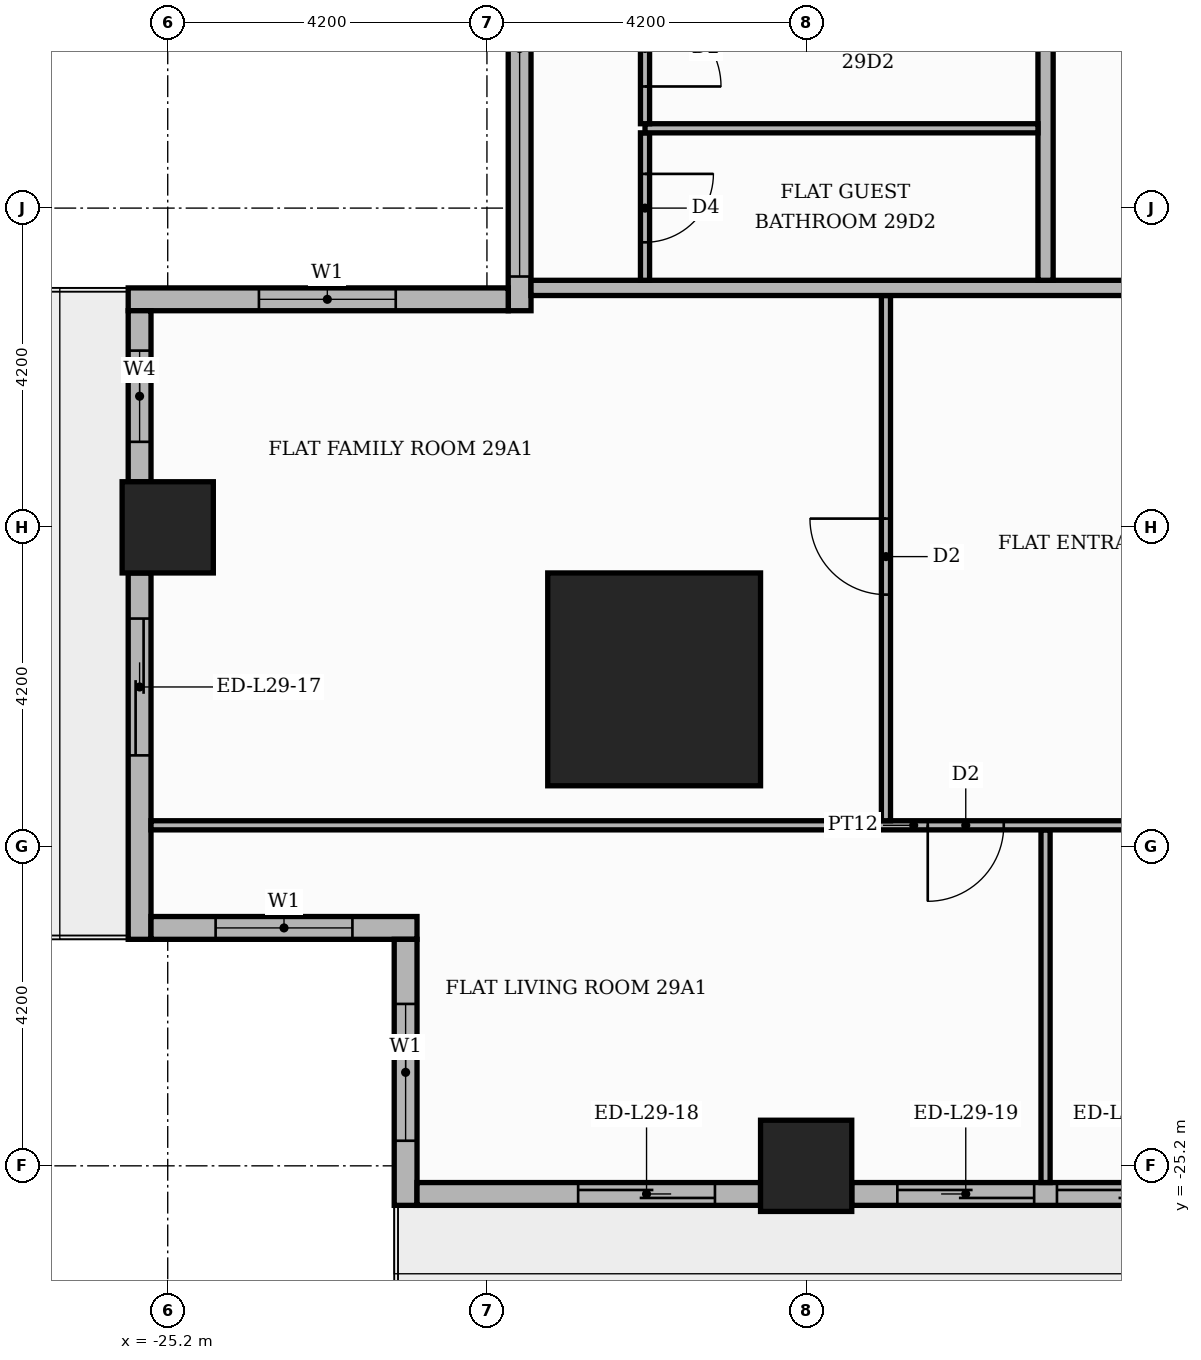
"""IFC4 building model, lengths in metres.
Left out: names, types, materials, properties, quantities, classifications, styles, units other than length and angle.
Written with IfcOpenShell. Run it as: python <this file> out.ifc"""

import sys

from ifc_helpers import new_model, si_unit, direction, frame, frame_2d, origin, origin_2d, place, context, subcontext, project, spatial, rectangle, extrude, element, fill, save


model = new_model("IFC4")
c1 = context("Model", 3, precision=1e-05, world=origin(), true_north=direction((0.0, 1.0)))
c2 = subcontext(c1, "Body", "Model", "MODEL_VIEW")
j1 = project(units=[si_unit("LENGTHUNIT", "METRE"), si_unit("PLANEANGLEUNIT", "RADIAN")], contexts=[c1])
p1 = place(None, origin())
s1 = spatial("IfcSite", under=j1, at=p1, CompositionType="ELEMENT")
p2 = place(p1, origin())
s2 = spatial("IfcBuilding", under=s1, at=p2, CompositionType="ELEMENT")
p3 = place(p2, frame((0.0, 0.0, 122.1)))
s3 = spatial("IfcBuildingStorey", under=s2, at=p3, CompositionType="ELEMENT", Elevation=122.1)
p4 = place(p3, frame((-18.8, -18.8, 0.0), z_axis=(0.0, 0.0, 1.0), x_axis=(1.0, 0.0, 0.0)))
e1 = element("IfcColumn", 1, at=p4, inside=s3, PredefinedType="COLUMN", context=c2, shape_type="SweptSolid", body=[
    extrude(rectangle(XDim=2.8, YDim=2.8, at=origin_2d()), origin(), (0.0, 0.0, 1.0), 3.9),
])
for number, where, z_axis, x_axis in (
    (2, (-16.8, -25.2, 0.0), (0.0, 0.0, 1.0), (1.0, 0.0, 0.0)),
    (3, (-25.2, -16.8, 0.0), (0.0, 0.0, 1.0), (1.0, 0.0, 0.0)),
):
    element("IfcColumn", number, at=place(p3, frame(where, z_axis=z_axis, x_axis=x_axis)), inside=s3, PredefinedType="COLUMN", context=c2, shape_type="SweptSolid", body=[
        extrude(rectangle(XDim=1.2, YDim=1.2, at=origin_2d()), origin(), (0.0, 0.0, 1.0), 3.9),
    ])
p5 = place(p3, frame((-20.57, 13.65, 0.0), z_axis=(0.0, 0.0, 1.0), x_axis=(0.0, -1.0, 0.0)))
e4 = element("IfcWall", 4, at=p5, inside=s3, PredefinedType="STANDARD", context=c2, shape_type="SweptSolid", body=[
    extrude(rectangle(XDim=27.6, YDim=0.3, at=frame_2d((13.8, 0.0))), origin(), (0.0, 0.0, 1.0), 3.4),
])
p6 = place(p5, frame((0.15, 0.0, 0.9)))
e5 = element("IfcOpeningElement", 5, at=p6, cuts=e4, PredefinedType="OPENING", context=c2, shape_type="SweptSolid", body=[
    extrude(rectangle(XDim=6.0, YDim=2.1, at=frame_2d((3.0, 1.05))), frame((0.0, 0.16, 0.0), z_axis=(0.0, -1.0, 0.0), x_axis=(1.0, 0.0, 0.0)), (0.0, 0.0, 1.0), 0.32),
])
p7 = place(p5, frame((6.45, 0.0, 0.9)))
e6 = element("IfcOpeningElement", 6, at=p7, cuts=e4, PredefinedType="OPENING", context=c2, shape_type="SweptSolid", body=[
    extrude(rectangle(XDim=1.8, YDim=2.1, at=frame_2d((0.9, 1.05))), frame((0.0, 0.16, 0.0), z_axis=(0.0, -1.0, 0.0), x_axis=(1.0, 0.0, 0.0)), (0.0, 0.0, 1.0), 0.32),
])
p8 = place(p5, frame((8.55, 0.0, 0.9)))
e7 = element("IfcOpeningElement", 7, at=p8, cuts=e4, PredefinedType="OPENING", context=c2, shape_type="SweptSolid", body=[
    extrude(rectangle(XDim=6.0, YDim=2.1, at=frame_2d((3.0, 1.05))), frame((0.0, 0.16, 0.0), z_axis=(0.0, -1.0, 0.0), x_axis=(1.0, 0.0, 0.0)), (0.0, 0.0, 1.0), 0.32),
])
p9 = place(p5, frame((14.85, 0.0, 0.9)))
e8 = element("IfcOpeningElement", 8, at=p9, cuts=e4, PredefinedType="OPENING", context=c2, shape_type="SweptSolid", body=[
    extrude(rectangle(XDim=6.0, YDim=2.1, at=frame_2d((3.0, 1.05))), frame((0.0, 0.16, 0.0), z_axis=(0.0, -1.0, 0.0), x_axis=(1.0, 0.0, 0.0)), (0.0, 0.0, 1.0), 0.32),
])
p10 = place(p5, frame((21.15, 0.0, 0.9)))
e9 = element("IfcOpeningElement", 9, at=p10, cuts=e4, PredefinedType="OPENING", context=c2, shape_type="SweptSolid", body=[
    extrude(rectangle(XDim=6.0, YDim=2.1, at=frame_2d((3.0, 1.05))), frame((0.0, 0.16, 0.0), z_axis=(0.0, -1.0, 0.0), x_axis=(1.0, 0.0, 0.0)), (0.0, 0.0, 1.0), 0.32),
])
p11 = place(p3, frame((-20.72, -13.8, 0.0), z_axis=(0.0, 0.0, 1.0), x_axis=(-1.0, 0.0, 0.0)))
e10 = element("IfcWall", 10, at=p11, inside=s3, PredefinedType="STANDARD", context=c2, shape_type="SweptSolid", body=[
    extrude(rectangle(XDim=5.0, YDim=0.3, at=frame_2d((2.5, 0.0))), origin(), (0.0, 0.0, 1.0), 3.4),
])
p12 = place(p11, frame((1.48, 0.0, 0.9)))
e11 = element("IfcOpeningElement", 11, at=p12, cuts=e10, PredefinedType="OPENING", context=c2, shape_type="SweptSolid", body=[
    extrude(rectangle(XDim=1.8, YDim=2.1, at=frame_2d((0.9, 1.05))), frame((0.0, 0.16, 0.0), z_axis=(0.0, -1.0, 0.0), x_axis=(1.0, 0.0, 0.0)), (0.0, 0.0, 1.0), 0.32),
])
p13 = place(p3, frame((-25.57, -13.95, 0.0), z_axis=(0.0, 0.0, 1.0), x_axis=(0.0, -1.0, 0.0)))
e12 = element("IfcWall", 12, at=p13, inside=s3, PredefinedType="STANDARD", context=c2, shape_type="SweptSolid", body=[
    extrude(rectangle(XDim=2.25, YDim=0.3, at=frame_2d((1.125, 0.0))), origin(), (0.0, 0.0, 1.0), 3.4),
])
p14 = place(p13, frame((0.525, 0.0, 0.9)))
e13 = element("IfcOpeningElement", 13, at=p14, cuts=e12, PredefinedType="OPENING", context=c2, shape_type="SweptSolid", body=[
    extrude(rectangle(XDim=1.2, YDim=2.1, at=frame_2d((0.6, 1.05))), frame((0.0, 0.16, 0.0), z_axis=(0.0, -1.0, 0.0), x_axis=(1.0, 0.0, 0.0)), (0.0, 0.0, 1.0), 0.32),
])
p15 = place(p3, frame((-25.57, -17.4, 0.0), z_axis=(0.0, 0.0, 1.0), x_axis=(0.0, -1.0, 0.0)))
e14 = element("IfcWall", 14, at=p15, inside=s3, PredefinedType="STANDARD", context=c2, shape_type="SweptSolid", body=[
    extrude(rectangle(XDim=4.82, YDim=0.3, at=frame_2d((2.41, 0.0))), origin(), (0.0, 0.0, 1.0), 3.4),
])
p16 = place(p15, frame((0.6, 0.0, 0.0)))
e15 = element("IfcOpeningElement", 15, at=p16, cuts=e14, PredefinedType="OPENING", context=c2, shape_type="SweptSolid", body=[
    extrude(rectangle(XDim=1.8, YDim=2.4, at=frame_2d((0.9, 1.2))), frame((0.0, 0.16, 0.0), z_axis=(0.0, -1.0, 0.0), x_axis=(1.0, 0.0, 0.0)), (0.0, 0.0, 1.0), 0.32),
])
p17 = place(p3, frame((-25.42, -22.07, 0.0), z_axis=(0.0, 0.0, 1.0), x_axis=(1.0, 0.0, 0.0)))
e16 = element("IfcWall", 16, at=p17, inside=s3, PredefinedType="STANDARD", context=c2, shape_type="SweptSolid", body=[
    extrude(rectangle(XDim=3.5, YDim=0.3, at=frame_2d((1.75, 0.0))), origin(), (0.0, 0.0, 1.0), 3.4),
])
p18 = place(p17, frame((0.85, 0.0, 0.9)))
e17 = element("IfcOpeningElement", 17, at=p18, cuts=e16, PredefinedType="OPENING", context=c2, shape_type="SweptSolid", body=[
    extrude(rectangle(XDim=1.8, YDim=2.1, at=frame_2d((0.9, 1.05))), frame((0.0, 0.16, 0.0), z_axis=(0.0, -1.0, 0.0), x_axis=(1.0, 0.0, 0.0)), (0.0, 0.0, 1.0), 0.32),
])
p19 = place(p3, frame((-22.07, -22.22, 0.0), z_axis=(0.0, 0.0, 1.0), x_axis=(0.0, -1.0, 0.0)))
e18 = element("IfcWall", 18, at=p19, inside=s3, PredefinedType="STANDARD", context=c2, shape_type="SweptSolid", body=[
    extrude(rectangle(XDim=3.5, YDim=0.3, at=frame_2d((1.75, 0.0))), origin(), (0.0, 0.0, 1.0), 3.4),
])
p20 = place(p19, frame((0.85, 0.0, 0.9)))
e19 = element("IfcOpeningElement", 19, at=p20, cuts=e18, PredefinedType="OPENING", context=c2, shape_type="SweptSolid", body=[
    extrude(rectangle(XDim=1.8, YDim=2.1, at=frame_2d((0.9, 1.05))), frame((0.0, 0.16, 0.0), z_axis=(0.0, -1.0, 0.0), x_axis=(1.0, 0.0, 0.0)), (0.0, 0.0, 1.0), 0.32),
])
p21 = place(p3, frame((-21.92, -25.57, 0.0), z_axis=(0.0, 0.0, 1.0), x_axis=(1.0, 0.0, 0.0)))
e20 = element("IfcWall", 20, at=p21, inside=s3, PredefinedType="STANDARD", context=c2, shape_type="SweptSolid", body=[
    extrude(rectangle(XDim=4.52, YDim=0.3, at=frame_2d((2.26, 0.0))), origin(), (0.0, 0.0, 1.0), 3.4),
])
p22 = place(p21, frame((2.12, 0.0, 0.0)))
e21 = element("IfcOpeningElement", 21, at=p22, cuts=e20, PredefinedType="OPENING", context=c2, shape_type="SweptSolid", body=[
    extrude(rectangle(XDim=1.8, YDim=2.4, at=frame_2d((0.9, 1.2))), frame((0.0, 0.16, 0.0), z_axis=(0.0, -1.0, 0.0), x_axis=(1.0, 0.0, 0.0)), (0.0, 0.0, 1.0), 0.32),
])
p23 = place(p3, frame((-16.2, -25.57, 0.0), z_axis=(0.0, 0.0, 1.0), x_axis=(1.0, 0.0, 0.0)))
e22 = element("IfcWall", 22, at=p23, inside=s3, PredefinedType="STANDARD", context=c2, shape_type="SweptSolid", body=[
    extrude(rectangle(XDim=7.2, YDim=0.3, at=frame_2d((3.6, 0.0))), origin(), (0.0, 0.0, 1.0), 3.4),
])
p24 = place(p23, frame((0.6, 0.0, 0.0)))
e23 = element("IfcOpeningElement", 23, at=p24, cuts=e22, PredefinedType="OPENING", context=c2, shape_type="SweptSolid", body=[
    extrude(rectangle(XDim=1.8, YDim=2.4, at=frame_2d((0.9, 1.2))), frame((0.0, 0.16, 0.0), z_axis=(0.0, -1.0, 0.0), x_axis=(1.0, 0.0, 0.0)), (0.0, 0.0, 1.0), 0.32),
])
p25 = place(p23, frame((2.7, 0.0, 0.0)))
e24 = element("IfcOpeningElement", 24, at=p25, cuts=e22, PredefinedType="OPENING", context=c2, shape_type="SweptSolid", body=[
    extrude(rectangle(XDim=1.8, YDim=2.4, at=frame_2d((0.9, 1.2))), frame((0.0, 0.16, 0.0), z_axis=(0.0, -1.0, 0.0), x_axis=(1.0, 0.0, 0.0)), (0.0, 0.0, 1.0), 0.32),
])
p26 = place(p23, frame((4.8, 0.0, 0.9)))
e25 = element("IfcOpeningElement", 25, at=p26, cuts=e22, PredefinedType="OPENING", context=c2, shape_type="SweptSolid", body=[
    extrude(rectangle(XDim=1.8, YDim=2.1, at=frame_2d((0.9, 1.05))), frame((0.0, 0.16, 0.0), z_axis=(0.0, -1.0, 0.0), x_axis=(1.0, 0.0, 0.0)), (0.0, 0.0, 1.0), 0.32),
])
p27 = place(p3, frame((-13.65, -25.42, 0.0), z_axis=(0.0, 0.0, 1.0), x_axis=(0.0, 1.0, 0.0)))
e26 = element("IfcWall", 26, at=p27, inside=s3, PredefinedType="PARTITIONING", context=c2, shape_type="SweptSolid", body=[
    extrude(rectangle(XDim=4.64, YDim=0.12, at=frame_2d((2.32, 0.0))), origin(), (0.0, 0.0, 1.0), 3.4),
])
p28 = place(p3, frame((-25.42, -20.72, 0.0), z_axis=(0.0, 0.0, 1.0), x_axis=(1.0, 0.0, 0.0)))
e27 = element("IfcWall", 27, at=p28, inside=s3, PredefinedType="PARTITIONING", context=c2, shape_type="SweptSolid", body=[
    extrude(rectangle(XDim=20.07, YDim=0.12, at=frame_2d((10.035, 0.0))), origin(), (0.0, 0.0, 1.0), 3.4),
])
p29 = place(p28, frame((10.22, 0.0, 0.0)))
e28 = element("IfcOpeningElement", 28, at=p29, cuts=e27, PredefinedType="OPENING", context=c2, shape_type="SweptSolid", body=[
    extrude(rectangle(XDim=1.0, YDim=2.1, at=frame_2d((0.5, 1.05))), frame((0.0, 0.07, 0.0), z_axis=(0.0, -1.0, 0.0), x_axis=(1.0, 0.0, 0.0)), (0.0, 0.0, 1.0), 0.14),
])
p30 = place(p28, frame((13.42, 0.0, 0.0)))
e29 = element("IfcOpeningElement", 29, at=p30, cuts=e27, PredefinedType="OPENING", context=c2, shape_type="SweptSolid", body=[
    extrude(rectangle(XDim=0.9, YDim=2.1, at=frame_2d((0.45, 1.05))), frame((0.0, 0.07, 0.0), z_axis=(0.0, -1.0, 0.0), x_axis=(1.0, 0.0, 0.0)), (0.0, 0.0, 1.0), 0.14),
])
p31 = place(p3, frame((-15.75, -20.66, 0.0), z_axis=(0.0, 0.0, 1.0), x_axis=(0.0, 1.0, 0.0)))
e30 = element("IfcWall", 30, at=p31, inside=s3, PredefinedType="PARTITIONING", context=c2, shape_type="SweptSolid", body=[
    extrude(rectangle(XDim=6.91, YDim=0.12, at=frame_2d((3.455, 0.0))), origin(), (0.0, 0.0, 1.0), 3.4),
])
p32 = place(p31, frame((2.975, 0.0, 0.0)))
e31 = element("IfcOpeningElement", 31, at=p32, cuts=e30, PredefinedType="OPENING", context=c2, shape_type="SweptSolid", body=[
    extrude(rectangle(XDim=1.0, YDim=2.1, at=frame_2d((0.5, 1.05))), frame((0.0, 0.07, 0.0), z_axis=(0.0, -1.0, 0.0), x_axis=(1.0, 0.0, 0.0)), (0.0, 0.0, 1.0), 0.14),
])
p33 = place(p3, frame((-20.42, -13.65, 0.0), z_axis=(0.0, 0.0, 1.0), x_axis=(1.0, 0.0, 0.0)))
e32 = element("IfcWall", 32, at=p33, inside=s3, PredefinedType="PARTITIONING", context=c2, shape_type="SweptSolid", body=[
    extrude(rectangle(XDim=34.07, YDim=0.2, at=frame_2d((17.035, 0.0))), origin(), (0.0, 0.0, 1.0), 3.4),
])
p34 = place(p33, frame((8.32, 0.0, 0.0)))
e33 = element("IfcOpeningElement", 33, at=p34, cuts=e32, PredefinedType="OPENING", context=c2, shape_type="SweptSolid", body=[
    extrude(rectangle(XDim=1.1, YDim=2.4, at=frame_2d((0.55, 1.2))), frame((0.0, 0.11, 0.0), z_axis=(0.0, -1.0, 0.0), x_axis=(1.0, 0.0, 0.0)), (0.0, 0.0, 1.0), 0.22),
])
p35 = place(p33, frame((16.72, 0.0, 0.0)))
e34 = element("IfcOpeningElement", 34, at=p35, cuts=e32, PredefinedType="OPENING", context=c2, shape_type="SweptSolid", body=[
    extrude(rectangle(XDim=1.1, YDim=2.4, at=frame_2d((0.55, 1.2))), frame((0.0, 0.11, 0.0), z_axis=(0.0, -1.0, 0.0), x_axis=(1.0, 0.0, 0.0)), (0.0, 0.0, 1.0), 0.22),
])
p36 = place(p3, frame((-18.92, -13.55, 0.0), z_axis=(0.0, 0.0, 1.0), x_axis=(0.0, 1.0, 0.0)))
e35 = element("IfcWall", 35, at=p36, inside=s3, PredefinedType="PARTITIONING", context=c2, shape_type="SweptSolid", body=[
    extrude(rectangle(XDim=1.94, YDim=0.12, at=frame_2d((0.97, 0.0))), origin(), (0.0, 0.0, 1.0), 3.4),
])
p37 = place(p36, frame((0.5, 0.0, 0.0)))
e36 = element("IfcOpeningElement", 36, at=p37, cuts=e35, PredefinedType="OPENING", context=c2, shape_type="SweptSolid", body=[
    extrude(rectangle(XDim=0.9, YDim=2.1, at=frame_2d((0.45, 1.05))), frame((0.0, 0.07, 0.0), z_axis=(0.0, -1.0, 0.0), x_axis=(1.0, 0.0, 0.0)), (0.0, 0.0, 1.0), 0.14),
])
p38 = place(p3, frame((-13.65, -13.55, 0.0), z_axis=(0.0, 0.0, 1.0), x_axis=(0.0, 1.0, 0.0)))
e37 = element("IfcWall", 37, at=p38, inside=s3, PredefinedType="PARTITIONING", context=c2, shape_type="SweptSolid", body=[
    extrude(rectangle(XDim=18.7, YDim=0.2, at=frame_2d((9.35, 0.0))), origin(), (0.0, 0.0, 1.0), 3.4),
])
p39 = place(p38, frame((11.95, 0.0, 0.0)))
e38 = element("IfcOpeningElement", 38, at=p39, cuts=e37, PredefinedType="OPENING", context=c2, shape_type="SweptSolid", body=[
    extrude(rectangle(XDim=1.1, YDim=2.4, at=frame_2d((0.55, 1.2))), frame((0.0, 0.11, 0.0), z_axis=(0.0, -1.0, 0.0), x_axis=(1.0, 0.0, 0.0)), (0.0, 0.0, 1.0), 0.22),
])
p40 = place(p3, frame((-18.92, -11.55, 0.0), z_axis=(0.0, 0.0, 1.0), x_axis=(1.0, 0.0, 0.0)))
e39 = element("IfcWall", 39, at=p40, inside=s3, PredefinedType="PARTITIONING", context=c2, shape_type="SweptSolid", body=[
    extrude(rectangle(XDim=5.17, YDim=0.12, at=frame_2d((2.585, 0.0))), origin(), (0.0, 0.0, 1.0), 3.4),
])
p41 = place(p3, frame((-18.92, -11.49, 0.0), z_axis=(0.0, 0.0, 1.0), x_axis=(0.0, 1.0, 0.0)))
e40 = element("IfcWall", 40, at=p41, inside=s3, PredefinedType="PARTITIONING", context=c2, shape_type="SweptSolid", body=[
    extrude(rectangle(XDim=1.98, YDim=0.12, at=frame_2d((0.99, 0.0))), origin(), (0.0, 0.0, 1.0), 3.4),
])
p42 = place(p41, frame((0.49, 0.0, 0.0)))
e41 = element("IfcOpeningElement", 41, at=p42, cuts=e40, PredefinedType="OPENING", context=c2, shape_type="SweptSolid", body=[
    extrude(rectangle(XDim=1.0, YDim=2.1, at=frame_2d((0.5, 1.05))), frame((0.0, 0.07, 0.0), z_axis=(0.0, -1.0, 0.0), x_axis=(1.0, 0.0, 0.0)), (0.0, 0.0, 1.0), 0.14),
])
p43 = place(p10, origin())
e42 = element("IfcWindow", 42, at=p43, inside=s3, PartitioningType="SINGLE_PANEL", PredefinedType="WINDOW", context=c2, shape_type="SweptSolid", body=[
    extrude(rectangle(XDim=6.0, YDim=2.1, at=frame_2d((3.0, 1.05))), frame((0.0, 0.03, 0.0), z_axis=(0.0, -1.0, 0.0), x_axis=(1.0, 0.0, 0.0)), (0.0, 0.0, 1.0), 0.06),
])
fill(e9, e42)
p44 = place(p12, origin())
e43 = element("IfcWindow", 43, at=p44, inside=s3, PartitioningType="SINGLE_PANEL", PredefinedType="WINDOW", context=c2, shape_type="SweptSolid", body=[
    extrude(rectangle(XDim=1.8, YDim=2.1, at=frame_2d((0.9, 1.05))), frame((0.0, 0.03, 0.0), z_axis=(0.0, -1.0, 0.0), x_axis=(1.0, 0.0, 0.0)), (0.0, 0.0, 1.0), 0.06),
])
fill(e11, e43)
p45 = place(p14, origin())
e44 = element("IfcWindow", 44, at=p45, inside=s3, PartitioningType="SINGLE_PANEL", PredefinedType="WINDOW", context=c2, shape_type="SweptSolid", body=[
    extrude(rectangle(XDim=1.2, YDim=2.1, at=frame_2d((0.6, 1.05))), frame((0.0, 0.03, 0.0), z_axis=(0.0, -1.0, 0.0), x_axis=(1.0, 0.0, 0.0)), (0.0, 0.0, 1.0), 0.06),
])
fill(e13, e44)
p46 = place(p16, origin())
e45 = element("IfcDoor", 45, at=p46, inside=s3, OperationType="SLIDING_TO_LEFT", PredefinedType="DOOR", context=c2, shape_type="SweptSolid", body=[
    extrude(rectangle(XDim=1.8, YDim=2.4, at=frame_2d((0.9, 1.2))), frame((0.0, 0.025, 0.0), z_axis=(0.0, -1.0, 0.0), x_axis=(1.0, 0.0, 0.0)), (0.0, 0.0, 1.0), 0.05),
])
fill(e15, e45)
p47 = place(p18, origin())
e46 = element("IfcWindow", 46, at=p47, inside=s3, PartitioningType="SINGLE_PANEL", PredefinedType="WINDOW", context=c2, shape_type="SweptSolid", body=[
    extrude(rectangle(XDim=1.8, YDim=2.1, at=frame_2d((0.9, 1.05))), frame((0.0, 0.03, 0.0), z_axis=(0.0, -1.0, 0.0), x_axis=(1.0, 0.0, 0.0)), (0.0, 0.0, 1.0), 0.06),
])
fill(e17, e46)
p48 = place(p20, origin())
e47 = element("IfcWindow", 47, at=p48, inside=s3, PartitioningType="SINGLE_PANEL", PredefinedType="WINDOW", context=c2, shape_type="SweptSolid", body=[
    extrude(rectangle(XDim=1.8, YDim=2.1, at=frame_2d((0.9, 1.05))), frame((0.0, 0.03, 0.0), z_axis=(0.0, -1.0, 0.0), x_axis=(1.0, 0.0, 0.0)), (0.0, 0.0, 1.0), 0.06),
])
fill(e19, e47)
p49 = place(p22, origin())
e48 = element("IfcDoor", 48, at=p49, inside=s3, OperationType="SLIDING_TO_RIGHT", PredefinedType="DOOR", context=c2, shape_type="SweptSolid", body=[
    extrude(rectangle(XDim=1.8, YDim=2.4, at=frame_2d((0.9, 1.2))), frame((0.0, 0.025, 0.0), z_axis=(0.0, -1.0, 0.0), x_axis=(1.0, 0.0, 0.0)), (0.0, 0.0, 1.0), 0.05),
])
fill(e21, e48)
p50 = place(p24, origin())
e49 = element("IfcDoor", 49, at=p50, inside=s3, OperationType="SLIDING_TO_LEFT", PredefinedType="DOOR", context=c2, shape_type="SweptSolid", body=[
    extrude(rectangle(XDim=1.8, YDim=2.4, at=frame_2d((0.9, 1.2))), frame((0.0, 0.025, 0.0), z_axis=(0.0, -1.0, 0.0), x_axis=(1.0, 0.0, 0.0)), (0.0, 0.0, 1.0), 0.05),
])
fill(e23, e49)
p51 = place(p25, origin())
e50 = element("IfcDoor", 50, at=p51, inside=s3, OperationType="SLIDING_TO_RIGHT", PredefinedType="DOOR", context=c2, shape_type="SweptSolid", body=[
    extrude(rectangle(XDim=1.8, YDim=2.4, at=frame_2d((0.9, 1.2))), frame((0.0, 0.025, 0.0), z_axis=(0.0, -1.0, 0.0), x_axis=(1.0, 0.0, 0.0)), (0.0, 0.0, 1.0), 0.05),
])
fill(e24, e50)
p52 = place(p32, origin())
e51 = element("IfcDoor", 51, at=p52, inside=s3, OperationType="SINGLE_SWING_RIGHT", PredefinedType="DOOR", context=c2, shape_type="SweptSolid", body=[
    extrude(rectangle(XDim=1.0, YDim=2.1, at=frame_2d((0.5, 1.05))), frame((0.0, 0.025, 0.0), z_axis=(0.0, -1.0, 0.0), x_axis=(1.0, 0.0, 0.0)), (0.0, 0.0, 1.0), 0.05),
])
fill(e31, e51)
p53 = place(p29, frame((1.0, 0.0, 0.0), z_axis=(0.0, 0.0, 1.0), x_axis=(-1.0, 0.0, 0.0)))
e52 = element("IfcDoor", 52, at=p53, inside=s3, OperationType="SINGLE_SWING_LEFT", PredefinedType="DOOR", context=c2, shape_type="SweptSolid", body=[
    extrude(rectangle(XDim=1.0, YDim=2.1, at=frame_2d((0.5, 1.05))), frame((0.0, 0.025, 0.0), z_axis=(0.0, -1.0, 0.0), x_axis=(1.0, 0.0, 0.0)), (0.0, 0.0, 1.0), 0.05),
])
fill(e28, e52)
p54 = place(p42, frame((1.0, 0.0, 0.0), z_axis=(0.0, 0.0, 1.0), x_axis=(-1.0, 0.0, 0.0)))
e53 = element("IfcDoor", 53, at=p54, inside=s3, OperationType="SINGLE_SWING_LEFT", PredefinedType="DOOR", context=c2, shape_type="SweptSolid", body=[
    extrude(rectangle(XDim=1.0, YDim=2.1, at=frame_2d((0.5, 1.05))), frame((0.0, 0.025, 0.0), z_axis=(0.0, -1.0, 0.0), x_axis=(1.0, 0.0, 0.0)), (0.0, 0.0, 1.0), 0.05),
])
fill(e41, e53)
p55 = place(p37, frame((0.9, 0.0, 0.0), z_axis=(0.0, 0.0, 1.0), x_axis=(-1.0, 0.0, 0.0)))
e54 = element("IfcDoor", 54, at=p55, inside=s3, OperationType="SINGLE_SWING_RIGHT", PredefinedType="DOOR", context=c2, shape_type="SweptSolid", body=[
    extrude(rectangle(XDim=0.9, YDim=2.1, at=frame_2d((0.45, 1.05))), frame((0.0, 0.025, 0.0), z_axis=(0.0, -1.0, 0.0), x_axis=(1.0, 0.0, 0.0)), (0.0, 0.0, 1.0), 0.05),
])
fill(e36, e54)
save(model, sys.argv[1])
